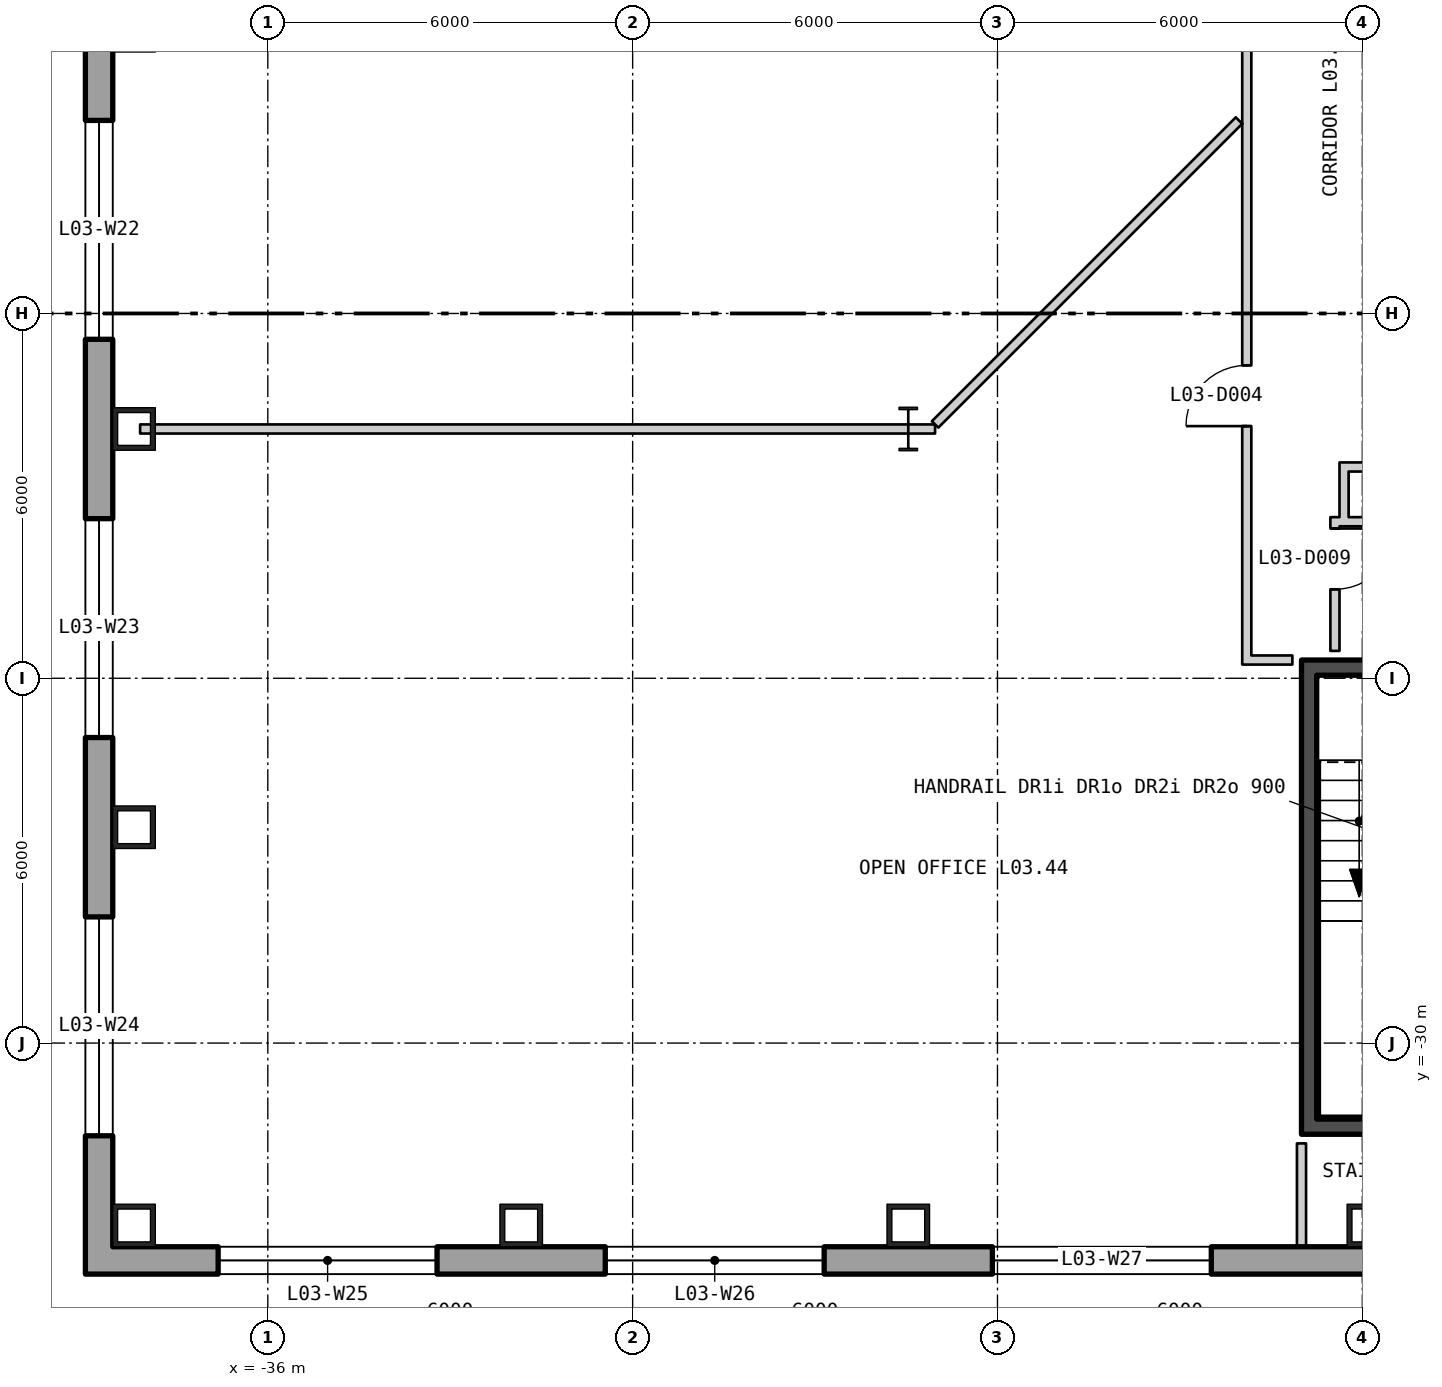
"""IFC4 building model, lengths in metres.
Left out: names, types, materials, properties, quantities, classifications, styles, units other than length and angle.
Written with IfcOpenShell. Run it as: python <this file> out.ifc"""

import sys

from ifc_helpers import new_model, si_unit, direction, frame, frame_2d, origin, origin_2d, place, context, subcontext, project, spatial, polyline, rectangle, hollow_rectangle, i_section, outline, extrude, element, fill, save


model = new_model("IFC4")
c1 = context("Model", 3, precision=1e-05, world=origin(), true_north=direction((0.0, 1.0)))
c2 = subcontext(c1, "Body", "Model", "MODEL_VIEW")
j1 = project(units=[si_unit("LENGTHUNIT", "METRE"), si_unit("PLANEANGLEUNIT", "RADIAN")], contexts=[c1])
p1 = place(None, origin())
s1 = spatial("IfcSite", under=j1, at=p1, CompositionType="ELEMENT")
p2 = place(p1, origin())
s2 = spatial("IfcBuilding", under=s1, at=p2, CompositionType="ELEMENT")
p3 = place(p2, frame((0.0, 0.0, 18.6)))
s3 = spatial("IfcBuildingStorey", under=s2, at=p3, CompositionType="ELEMENT", Elevation=18.6)
for number, where, z_axis, x_axis in (
    (1, (-38.2, -19.9, 0.0), (0.0, 0.0, 1.0), (0.0, -1.0, 0.0)),
    (2, (-38.2, -26.45, 0.0), (0.0, 0.0, 1.0), (0.0, -1.0, 0.0)),
    (3, (-38.2, -33.0, 0.0), (0.0, 0.0, 1.0), (1.0, 0.0, 0.0)),
    (4, (-31.833, -33.0, 0.0), (0.0, 0.0, 1.0), (1.0, 0.0, 0.0)),
    (5, (-25.467, -33.0, 0.0), (0.0, 0.0, 1.0), (1.0, 0.0, 0.0)),
    (6, (-17.9, -33.0, 0.0), (0.0, 0.0, 1.0), (1.0, 0.0, 0.0)),
):
    element("IfcColumn", number, at=place(p3, frame(where, z_axis=z_axis, x_axis=x_axis)), inside=s3, PredefinedType="COLUMN", context=c2, shape_type="SweptSolid", body=[
        extrude(hollow_rectangle(XDim=0.7, YDim=0.7, WallThickness=0.08, at=origin_2d()), origin(), (0.0, 0.0, 1.0), 5.1),
    ])
p4 = place(p3, frame((-25.467, -19.9, 0.0), z_axis=(0.0, 0.0, 1.0), x_axis=(1.0, 0.0, 0.0)))
e7 = element("IfcColumn", 7, at=p4, inside=s3, PredefinedType="COLUMN", context=c2, shape_type="SweptSolid", body=[
    extrude(i_section(OverallWidth=0.304, OverallDepth=0.716, WebThickness=0.021, FlangeThickness=0.04, at=origin_2d()), origin(), (0.0, 0.0, 1.0), 5.1),
])
p5 = place(p3, frame((-38.775, 19.975, -0.4), z_axis=(0.0, 0.0, 1.0), x_axis=(0.0, -1.0, 0.0)))
e8 = element("IfcWall", 8, at=p5, inside=s3, PredefinedType="SOLIDWALL", context=c2, shape_type="SweptSolid", body=[
    extrude(outline(polyline([(-0.225, -0.225), (53.775, -0.225), (53.325, 0.225), (0.225, 0.225), (-0.225, -0.225)])), origin(), (0.0, 0.0, 1.0), 5.1),
])
p6 = place(p5, frame((2.05, 0.0, 1.3)))
e9 = element("IfcOpeningElement", 9, at=p6, cuts=e8, PredefinedType="OPENING", context=c2, shape_type="SweptSolid", body=[
    extrude(rectangle(XDim=3.6, YDim=3.2, at=frame_2d((1.8, 1.6))), frame((0.0, 0.235, 0.0), z_axis=(0.0, -1.0, 0.0), x_axis=(1.0, 0.0, 0.0)), (0.0, 0.0, 1.0), 0.47),
])
p7 = place(p5, frame((8.6, 0.0, 1.3)))
e10 = element("IfcOpeningElement", 10, at=p7, cuts=e8, PredefinedType="OPENING", context=c2, shape_type="SweptSolid", body=[
    extrude(rectangle(XDim=3.6, YDim=3.2, at=frame_2d((1.8, 1.6))), frame((0.0, 0.235, 0.0), z_axis=(0.0, -1.0, 0.0), x_axis=(1.0, 0.0, 0.0)), (0.0, 0.0, 1.0), 0.47),
])
p8 = place(p5, frame((15.15, 0.0, 1.3)))
e11 = element("IfcOpeningElement", 11, at=p8, cuts=e8, PredefinedType="OPENING", context=c2, shape_type="SweptSolid", body=[
    extrude(rectangle(XDim=3.6, YDim=3.2, at=frame_2d((1.8, 1.6))), frame((0.0, 0.235, 0.0), z_axis=(0.0, -1.0, 0.0), x_axis=(1.0, 0.0, 0.0)), (0.0, 0.0, 1.0), 0.47),
])
p9 = place(p5, frame((21.7, 0.0, 1.3)))
e12 = element("IfcOpeningElement", 12, at=p9, cuts=e8, PredefinedType="OPENING", context=c2, shape_type="SweptSolid", body=[
    extrude(rectangle(XDim=3.6, YDim=3.2, at=frame_2d((1.8, 1.6))), frame((0.0, 0.235, 0.0), z_axis=(0.0, -1.0, 0.0), x_axis=(1.0, 0.0, 0.0)), (0.0, 0.0, 1.0), 0.47),
])
p10 = place(p5, frame((28.25, 0.0, 1.3)))
e13 = element("IfcOpeningElement", 13, at=p10, cuts=e8, PredefinedType="OPENING", context=c2, shape_type="SweptSolid", body=[
    extrude(rectangle(XDim=3.6, YDim=3.2, at=frame_2d((1.8, 1.6))), frame((0.0, 0.235, 0.0), z_axis=(0.0, -1.0, 0.0), x_axis=(1.0, 0.0, 0.0)), (0.0, 0.0, 1.0), 0.47),
])
p11 = place(p5, frame((34.8, 0.0, 1.3)))
e14 = element("IfcOpeningElement", 14, at=p11, cuts=e8, PredefinedType="OPENING", context=c2, shape_type="SweptSolid", body=[
    extrude(rectangle(XDim=3.6, YDim=3.2, at=frame_2d((1.8, 1.6))), frame((0.0, 0.235, 0.0), z_axis=(0.0, -1.0, 0.0), x_axis=(1.0, 0.0, 0.0)), (0.0, 0.0, 1.0), 0.47),
])
p12 = place(p5, frame((41.35, 0.0, 1.3)))
e15 = element("IfcOpeningElement", 15, at=p12, cuts=e8, PredefinedType="OPENING", context=c2, shape_type="SweptSolid", body=[
    extrude(rectangle(XDim=3.6, YDim=3.2, at=frame_2d((1.8, 1.6))), frame((0.0, 0.235, 0.0), z_axis=(0.0, -1.0, 0.0), x_axis=(1.0, 0.0, 0.0)), (0.0, 0.0, 1.0), 0.47),
])
p13 = place(p5, frame((47.9, 0.0, 1.3)))
e16 = element("IfcOpeningElement", 16, at=p13, cuts=e8, PredefinedType="OPENING", context=c2, shape_type="SweptSolid", body=[
    extrude(rectangle(XDim=3.6, YDim=3.2, at=frame_2d((1.8, 1.6))), frame((0.0, 0.235, 0.0), z_axis=(0.0, -1.0, 0.0), x_axis=(1.0, 0.0, 0.0)), (0.0, 0.0, 1.0), 0.47),
])
p14 = place(p3, frame((-38.775, -33.575, -0.4), z_axis=(0.0, 0.0, 1.0), x_axis=(1.0, 0.0, 0.0)))
e17 = element("IfcWall", 17, at=p14, inside=s3, PredefinedType="SOLIDWALL", context=c2, shape_type="SweptSolid", body=[
    extrude(outline(polyline([(-0.225, -0.225), (77.775, -0.225), (77.325, 0.225), (0.225, 0.225), (-0.225, -0.225)])), origin(), (0.0, 0.0, 1.0), 5.1),
])
p15 = place(p14, frame((1.958, 0.0, 1.3)))
e18 = element("IfcOpeningElement", 18, at=p15, cuts=e17, PredefinedType="OPENING", context=c2, shape_type="SweptSolid", body=[
    extrude(rectangle(XDim=3.6, YDim=3.2, at=frame_2d((1.8, 1.6))), frame((0.0, 0.235, 0.0), z_axis=(0.0, -1.0, 0.0), x_axis=(1.0, 0.0, 0.0)), (0.0, 0.0, 1.0), 0.47),
])
p16 = place(p14, frame((8.325, 0.0, 1.3)))
e19 = element("IfcOpeningElement", 19, at=p16, cuts=e17, PredefinedType="OPENING", context=c2, shape_type="SweptSolid", body=[
    extrude(rectangle(XDim=3.6, YDim=3.2, at=frame_2d((1.8, 1.6))), frame((0.0, 0.235, 0.0), z_axis=(0.0, -1.0, 0.0), x_axis=(1.0, 0.0, 0.0)), (0.0, 0.0, 1.0), 0.47),
])
p17 = place(p14, frame((14.692, 0.0, 1.3)))
e20 = element("IfcOpeningElement", 20, at=p17, cuts=e17, PredefinedType="OPENING", context=c2, shape_type="SweptSolid", body=[
    extrude(rectangle(XDim=3.6, YDim=3.2, at=frame_2d((1.8, 1.6))), frame((0.0, 0.235, 0.0), z_axis=(0.0, -1.0, 0.0), x_axis=(1.0, 0.0, 0.0)), (0.0, 0.0, 1.0), 0.47),
])
p18 = place(p14, frame((21.325, 0.0, 1.3)))
e21 = element("IfcOpeningElement", 21, at=p18, cuts=e17, PredefinedType="OPENING", context=c2, shape_type="SweptSolid", body=[
    extrude(rectangle(XDim=3.6, YDim=3.2, at=frame_2d((1.8, 1.6))), frame((0.0, 0.235, 0.0), z_axis=(0.0, -1.0, 0.0), x_axis=(1.0, 0.0, 0.0)), (0.0, 0.0, 1.0), 0.47),
])
p19 = place(p14, frame((27.425, 0.0, 1.3)))
e22 = element("IfcOpeningElement", 22, at=p19, cuts=e17, PredefinedType="OPENING", context=c2, shape_type="SweptSolid", body=[
    extrude(rectangle(XDim=3.6, YDim=3.2, at=frame_2d((1.8, 1.6))), frame((0.0, 0.235, 0.0), z_axis=(0.0, -1.0, 0.0), x_axis=(1.0, 0.0, 0.0)), (0.0, 0.0, 1.0), 0.47),
])
p20 = place(p14, frame((33.792, 0.0, 1.3)))
e23 = element("IfcOpeningElement", 23, at=p20, cuts=e17, PredefinedType="OPENING", context=c2, shape_type="SweptSolid", body=[
    extrude(rectangle(XDim=3.6, YDim=3.2, at=frame_2d((1.8, 1.6))), frame((0.0, 0.235, 0.0), z_axis=(0.0, -1.0, 0.0), x_axis=(1.0, 0.0, 0.0)), (0.0, 0.0, 1.0), 0.47),
])
p21 = place(p14, frame((40.158, 0.0, 1.3)))
e24 = element("IfcOpeningElement", 24, at=p21, cuts=e17, PredefinedType="OPENING", context=c2, shape_type="SweptSolid", body=[
    extrude(rectangle(XDim=3.6, YDim=3.2, at=frame_2d((1.8, 1.6))), frame((0.0, 0.235, 0.0), z_axis=(0.0, -1.0, 0.0), x_axis=(1.0, 0.0, 0.0)), (0.0, 0.0, 1.0), 0.47),
])
p22 = place(p14, frame((46.525, 0.0, 1.3)))
e25 = element("IfcOpeningElement", 25, at=p22, cuts=e17, PredefinedType="OPENING", context=c2, shape_type="SweptSolid", body=[
    extrude(rectangle(XDim=3.6, YDim=3.2, at=frame_2d((1.8, 1.6))), frame((0.0, 0.235, 0.0), z_axis=(0.0, -1.0, 0.0), x_axis=(1.0, 0.0, 0.0)), (0.0, 0.0, 1.0), 0.47),
])
p23 = place(p14, frame((52.625, 0.0, 1.3)))
e26 = element("IfcOpeningElement", 26, at=p23, cuts=e17, PredefinedType="OPENING", context=c2, shape_type="SweptSolid", body=[
    extrude(rectangle(XDim=3.6, YDim=3.2, at=frame_2d((1.8, 1.6))), frame((0.0, 0.235, 0.0), z_axis=(0.0, -1.0, 0.0), x_axis=(1.0, 0.0, 0.0)), (0.0, 0.0, 1.0), 0.47),
])
p24 = place(p14, frame((59.258, 0.0, 1.3)))
e27 = element("IfcOpeningElement", 27, at=p24, cuts=e17, PredefinedType="OPENING", context=c2, shape_type="SweptSolid", body=[
    extrude(rectangle(XDim=3.6, YDim=3.2, at=frame_2d((1.8, 1.6))), frame((0.0, 0.235, 0.0), z_axis=(0.0, -1.0, 0.0), x_axis=(1.0, 0.0, 0.0)), (0.0, 0.0, 1.0), 0.47),
])
p25 = place(p14, frame((65.625, 0.0, 1.3)))
e28 = element("IfcOpeningElement", 28, at=p25, cuts=e17, PredefinedType="OPENING", context=c2, shape_type="SweptSolid", body=[
    extrude(rectangle(XDim=3.6, YDim=3.2, at=frame_2d((1.8, 1.6))), frame((0.0, 0.235, 0.0), z_axis=(0.0, -1.0, 0.0), x_axis=(1.0, 0.0, 0.0)), (0.0, 0.0, 1.0), 0.47),
])
p26 = place(p14, frame((71.992, 0.0, 1.3)))
e29 = element("IfcOpeningElement", 29, at=p26, cuts=e17, PredefinedType="OPENING", context=c2, shape_type="SweptSolid", body=[
    extrude(rectangle(XDim=3.6, YDim=3.2, at=frame_2d((1.8, 1.6))), frame((0.0, 0.235, 0.0), z_axis=(0.0, -1.0, 0.0), x_axis=(1.0, 0.0, 0.0)), (0.0, 0.0, 1.0), 0.47),
])
p27 = place(p3, frame((-18.875, -31.25, 0.0), z_axis=(0.0, 0.0, 1.0), x_axis=(0.0, 1.0, 0.0)))
e30 = element("IfcWall", 30, at=p27, inside=s3, PredefinedType="SHEAR", context=c2, shape_type="SweptSolid", body=[
    extrude(rectangle(XDim=7.3, YDim=0.25, at=frame_2d((3.65, 0.0))), origin(), (0.0, 0.0, 1.0), 4.88),
])
p28 = place(p3, frame((-19.0, -31.375, 0.0), z_axis=(0.0, 0.0, 1.0), x_axis=(1.0, 0.0, 0.0)))
e31 = element("IfcWall", 31, at=p28, inside=s3, PredefinedType="SHEAR", context=c2, shape_type="SweptSolid", body=[
    extrude(rectangle(XDim=3.5, YDim=0.25, at=frame_2d((1.75, 0.0))), origin(), (0.0, 0.0, 1.0), 4.88),
])
p29 = place(p3, frame((-19.0, -23.825, 0.0), z_axis=(0.0, 0.0, 1.0), x_axis=(1.0, 0.0, 0.0)))
e32 = element("IfcWall", 32, at=p29, inside=s3, PredefinedType="SHEAR", context=c2, shape_type="SweptSolid", body=[
    extrude(rectangle(XDim=3.5, YDim=0.25, at=frame_2d((1.75, 0.0))), origin(), (0.0, 0.0, 1.0), 4.88),
])
p30 = place(p29, frame((1.15, 0.0, 0.0)))
e33 = element("IfcOpeningElement", 33, at=p30, cuts=e32, PredefinedType="OPENING", context=c2, shape_type="SweptSolid", body=[
    extrude(rectangle(XDim=1.2, YDim=2.1, at=frame_2d((0.6, 1.05))), frame((0.0, 0.135, 0.0), z_axis=(0.0, -1.0, 0.0), x_axis=(1.0, 0.0, 0.0)), (0.0, 0.0, 1.0), 0.27),
])
p31 = place(p3, frame((-38.1, -19.9, 0.0), z_axis=(0.0, 0.0, 1.0), x_axis=(1.0, 0.0, 0.0)))
e34 = element("IfcWall", 34, at=p31, inside=s3, PredefinedType="PARTITIONING", context=c2, shape_type="SweptSolid", body=[
    extrude(rectangle(XDim=12.633, YDim=0.15, at=frame_2d((6.316, 0.0))), origin(), (0.0, 0.0, 1.0), 4.09),
])
p32 = place(p3, frame((-25.467, -19.9, 0.0), z_axis=(0.0, 0.0, 1.0), x_axis=(1.0, 0.0, 0.0)))
e35 = element("IfcWall", 35, at=p32, inside=s3, PredefinedType="PARTITIONING", context=c2, shape_type="SweptSolid", body=[
    extrude(rectangle(XDim=0.441, YDim=0.15, at=frame_2d((0.221, 0.0))), origin(), (0.0, 0.0, 1.0), 4.88),
])
p33 = place(p3, frame((-25.026, -19.825, 0.0), z_axis=(0.0, 0.0, 1.0), x_axis=(0.707106781187, 0.707106781187, 0.0)))
e36 = element("IfcWall", 36, at=p33, inside=s3, PredefinedType="PARTITIONING", context=c2, shape_type="SweptSolid", body=[
    extrude(rectangle(XDim=7.068, YDim=0.15, at=frame_2d((3.534, 0.0))), origin(), (0.0, 0.0, 1.0), 4.88),
])
p34 = place(p3, frame((-19.9, -23.775, 0.0), z_axis=(0.0, 0.0, 1.0), x_axis=(0.0, 1.0, 0.0)))
e37 = element("IfcWall", 37, at=p34, inside=s3, PredefinedType="PARTITIONING", context=c2, shape_type="SweptSolid", body=[
    extrude(rectangle(XDim=21.187, YDim=0.15, at=frame_2d((10.594, 0.0))), origin(), (0.0, 0.0, 1.0), 4.88),
])
p35 = place(p34, frame((3.922, 0.0, 0.0)))
e38 = element("IfcOpeningElement", 38, at=p35, cuts=e37, PredefinedType="OPENING", context=c2, shape_type="SweptSolid", body=[
    extrude(rectangle(XDim=1.0, YDim=2.1, at=frame_2d((0.5, 1.05))), frame((0.0, 0.085, 0.0), z_axis=(0.0, -1.0, 0.0), x_axis=(1.0, 0.0, 0.0)), (0.0, 0.0, 1.0), 0.17),
])
p36 = place(p34, frame((12.423, 0.0, 0.0)))
e39 = element("IfcOpeningElement", 39, at=p36, cuts=e37, PredefinedType="OPENING", context=c2, shape_type="SweptSolid", body=[
    extrude(rectangle(XDim=1.0, YDim=2.1, at=frame_2d((0.5, 1.05))), frame((0.0, 0.085, 0.0), z_axis=(0.0, -1.0, 0.0), x_axis=(1.0, 0.0, 0.0)), (0.0, 0.0, 1.0), 0.17),
])
p37 = place(p3, frame((-19.825, -23.7, 0.0), z_axis=(0.0, 0.0, 1.0), x_axis=(1.0, 0.0, 0.0)))
e40 = element("IfcWall", 40, at=p37, inside=s3, PredefinedType="PARTITIONING", context=c2, shape_type="SweptSolid", body=[
    extrude(rectangle(XDim=0.675, YDim=0.15, at=frame_2d((0.338, 0.0))), origin(), (0.0, 0.0, 1.0), 4.88),
])
p38 = place(p3, frame((-19.0, -33.348, 0.0), z_axis=(0.0, 0.0, 1.0), x_axis=(0.0, 1.0, 0.0)))
e41 = element("IfcWall", 41, at=p38, inside=s3, PredefinedType="PARTITIONING", context=c2, shape_type="SweptSolid", body=[
    extrude(rectangle(XDim=0.448, YDim=0.15, at=frame_2d((0.224, 0.0))), origin(), (0.0, 0.0, 1.0), 4.88),
])
p39 = place(p3, frame((-19.0, -32.9, 0.0), z_axis=(0.0, 0.0, 1.0), x_axis=(0.0, 1.0, 0.0)))
e42 = element("IfcWall", 42, at=p39, inside=s3, PredefinedType="PARTITIONING", context=c2, shape_type="SweptSolid", body=[
    extrude(rectangle(XDim=1.25, YDim=0.15, at=frame_2d((0.625, 0.0))), origin(), (0.0, 0.0, 1.0), 4.19),
])
p40 = place(p3, frame((-18.45, -23.55, 0.0), z_axis=(0.0, 0.0, 1.0), x_axis=(0.0, 1.0, 0.0)))
e43 = element("IfcWall", 43, at=p40, inside=s3, PredefinedType="PARTITIONING", context=c2, shape_type="SweptSolid", body=[
    extrude(rectangle(XDim=2.2, YDim=0.15, at=frame_2d((1.1, 0.0))), origin(), (0.0, 0.0, 1.0), 4.88),
])
p41 = place(p40, frame((1.013, 0.0, 0.0)))
e44 = element("IfcOpeningElement", 44, at=p41, cuts=e43, PredefinedType="OPENING", context=c2, shape_type="SweptSolid", body=[
    extrude(rectangle(XDim=1.0, YDim=2.1, at=frame_2d((0.5, 1.05))), frame((0.0, 0.085, 0.0), z_axis=(0.0, -1.0, 0.0), x_axis=(1.0, 0.0, 0.0)), (0.0, 0.0, 1.0), 0.17),
])
p42 = place(p3, frame((-18.3, -21.5, 0.0), z_axis=(0.0, 0.0, 1.0), x_axis=(0.0, 1.0, 0.0)))
e45 = element("IfcWall", 45, at=p42, inside=s3, PredefinedType="PARTITIONING", context=c2, shape_type="SweptSolid", body=[
    extrude(rectangle(XDim=1.05, YDim=0.15, at=frame_2d((0.525, 0.0))), origin(), (0.0, 0.0, 1.0), 4.88),
])
for number, where, z_axis, x_axis in (
    (46, (-18.225, -21.425, 0.0), (0.0, 0.0, 1.0), (1.0, 0.0, 0.0)),
    (47, (-18.225, -20.525, 0.0), (0.0, 0.0, 1.0), (1.0, 0.0, 0.0)),
):
    element("IfcWall", number, at=place(p3, frame(where, z_axis=z_axis, x_axis=x_axis)), inside=s3, PredefinedType="PARTITIONING", context=c2, shape_type="SweptSolid", body=[
        extrude(rectangle(XDim=0.65, YDim=0.15, at=frame_2d((0.325, 0.0))), origin(), (0.0, 0.0, 1.0), 4.88),
    ])
p43 = place(p11, origin())
e48 = element("IfcWindow", 48, at=p43, inside=s3, PartitioningType="SINGLE_PANEL", PredefinedType="WINDOW", context=c2, shape_type="SweptSolid", body=[
    extrude(rectangle(XDim=3.6, YDim=3.2, at=frame_2d((1.8, 1.6))), frame((0.0, 0.105, 0.0), z_axis=(0.0, -1.0, 0.0), x_axis=(1.0, 0.0, 0.0)), (0.0, 0.0, 1.0), 0.06),
])
fill(e14, e48)
p44 = place(p12, origin())
e49 = element("IfcWindow", 49, at=p44, inside=s3, PartitioningType="SINGLE_PANEL", PredefinedType="WINDOW", context=c2, shape_type="SweptSolid", body=[
    extrude(rectangle(XDim=3.6, YDim=3.2, at=frame_2d((1.8, 1.6))), frame((0.0, 0.105, 0.0), z_axis=(0.0, -1.0, 0.0), x_axis=(1.0, 0.0, 0.0)), (0.0, 0.0, 1.0), 0.06),
])
fill(e15, e49)
p45 = place(p13, origin())
e50 = element("IfcWindow", 50, at=p45, inside=s3, PartitioningType="SINGLE_PANEL", PredefinedType="WINDOW", context=c2, shape_type="SweptSolid", body=[
    extrude(rectangle(XDim=3.6, YDim=3.2, at=frame_2d((1.8, 1.6))), frame((0.0, 0.105, 0.0), z_axis=(0.0, -1.0, 0.0), x_axis=(1.0, 0.0, 0.0)), (0.0, 0.0, 1.0), 0.06),
])
fill(e16, e50)
p46 = place(p15, origin())
e51 = element("IfcWindow", 51, at=p46, inside=s3, PartitioningType="SINGLE_PANEL", PredefinedType="WINDOW", context=c2, shape_type="SweptSolid", body=[
    extrude(rectangle(XDim=3.6, YDim=3.2, at=frame_2d((1.8, 1.6))), frame((0.0, 0.105, 0.0), z_axis=(0.0, -1.0, 0.0), x_axis=(1.0, 0.0, 0.0)), (0.0, 0.0, 1.0), 0.06),
])
fill(e18, e51)
p47 = place(p16, origin())
e52 = element("IfcWindow", 52, at=p47, inside=s3, PartitioningType="SINGLE_PANEL", PredefinedType="WINDOW", context=c2, shape_type="SweptSolid", body=[
    extrude(rectangle(XDim=3.6, YDim=3.2, at=frame_2d((1.8, 1.6))), frame((0.0, 0.105, 0.0), z_axis=(0.0, -1.0, 0.0), x_axis=(1.0, 0.0, 0.0)), (0.0, 0.0, 1.0), 0.06),
])
fill(e19, e52)
p48 = place(p17, origin())
e53 = element("IfcWindow", 53, at=p48, inside=s3, PartitioningType="SINGLE_PANEL", PredefinedType="WINDOW", context=c2, shape_type="SweptSolid", body=[
    extrude(rectangle(XDim=3.6, YDim=3.2, at=frame_2d((1.8, 1.6))), frame((0.0, 0.105, 0.0), z_axis=(0.0, -1.0, 0.0), x_axis=(1.0, 0.0, 0.0)), (0.0, 0.0, 1.0), 0.06),
])
fill(e20, e53)
p49 = place(p35, origin())
e54 = element("IfcDoor", 54, at=p49, inside=s3, OperationType="SINGLE_SWING_RIGHT", PredefinedType="DOOR", context=c2, shape_type="SweptSolid", body=[
    extrude(rectangle(XDim=1.0, YDim=2.1, at=frame_2d((0.5, 1.05))), frame((0.0, 0.025, 0.0), z_axis=(0.0, -1.0, 0.0), x_axis=(1.0, 0.0, 0.0)), (0.0, 0.0, 1.0), 0.05),
])
fill(e38, e54)
p50 = place(p41, origin())
e55 = element("IfcDoor", 55, at=p50, inside=s3, OperationType="SINGLE_SWING_RIGHT", PredefinedType="DOOR", context=c2, shape_type="SweptSolid", body=[
    extrude(rectangle(XDim=1.0, YDim=2.1, at=frame_2d((0.5, 1.05))), frame((0.0, 0.025, 0.0), z_axis=(0.0, -1.0, 0.0), x_axis=(1.0, 0.0, 0.0)), (0.0, 0.0, 1.0), 0.05),
])
fill(e44, e55)
save(model, sys.argv[1])
